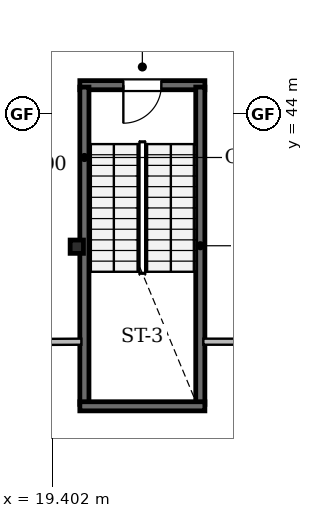
"""IFC4 building model, lengths in metres.
Left out: names, types, materials, properties, quantities, classifications, styles, units other than length and angle.
Written with IfcOpenShell. Run it as: python <this file> out.ifc"""

import sys

from ifc_helpers import new_model, si_unit, direction, frame, frame_2d, origin, origin_2d, place, context, subcontext, project, spatial, rectangle, i_section, extrude, element, fill, save


model = new_model("IFC4")
c1 = context("Model", 3, precision=1e-05, world=origin(), true_north=direction((0.0, 1.0)))
c2 = subcontext(c1, "Body", "Model", "MODEL_VIEW")
j1 = project(units=[si_unit("LENGTHUNIT", "METRE"), si_unit("PLANEANGLEUNIT", "RADIAN")], contexts=[c1])
p1 = place(None, origin())
s1 = spatial("IfcSite", under=j1, at=p1, CompositionType="ELEMENT")
p2 = place(p1, origin())
s2 = spatial("IfcBuilding", under=s1, at=p2, CompositionType="ELEMENT")
p3 = place(p2, frame((0.0, 0.0, 4.8)))
s3 = spatial("IfcBuildingStorey", under=s2, at=p3, CompositionType="ELEMENT", Elevation=4.8)
p4 = place(p3, frame((20.05, 40.5, 0.0), z_axis=(0.0, 0.0, 1.0), x_axis=(1.0, 0.0, 0.0)))
e1 = element("IfcColumn", 1, at=p4, inside=s3, PredefinedType="PILASTER", context=c2, shape_type="SweptSolid", body=[
    extrude(i_section(OverallWidth=0.35, OverallDepth=0.35, WebThickness=0.012, FlangeThickness=0.019, FilletRadius=0.02, at=origin_2d()), origin(), (0.0, 0.0, 1.0), 4.8),
])
p5 = place(p3, frame((20.13, 44.75, 0.0), z_axis=(0.0, 0.0, 1.0), x_axis=(1.0, 0.0, 0.0)))
e2 = element("IfcWall", 2, at=p5, inside=s3, PredefinedType="SHEAR", context=c2, shape_type="SweptSolid", body=[
    extrude(rectangle(XDim=3.29, YDim=0.24, at=frame_2d((1.645, 0.0))), origin(), (0.0, 0.0, 1.0), 4.5),
])
p6 = place(p5, frame((1.145, 0.0, 0.0)))
e3 = element("IfcOpeningElement", 3, at=p6, cuts=e2, PredefinedType="OPENING", context=c2, shape_type="SweptSolid", body=[
    extrude(rectangle(XDim=1.0, YDim=2.15, at=frame_2d((0.5, 1.075))), frame((0.0, 0.13, 0.0), z_axis=(0.0, -1.0, 0.0), x_axis=(1.0, 0.0, 0.0)), (0.0, 0.0, 1.0), 0.26),
])
for number, where, z_axis, x_axis in (
    (4, (20.25, 36.35, 0.0), (0.0, 0.0, 1.0), (0.0, 1.0, 0.0)),
    (5, (23.3, 36.35, 0.0), (0.0, 0.0, 1.0), (0.0, 1.0, 0.0)),
):
    element("IfcWall", number, at=place(p3, frame(where, z_axis=z_axis, x_axis=x_axis)), inside=s3, PredefinedType="SHEAR", context=c2, shape_type="SweptSolid", body=[
        extrude(rectangle(XDim=8.35, YDim=0.24, at=frame_2d((4.175, 0.0))), origin(), (0.0, 0.0, 1.0), 4.5),
    ])
p7 = place(p3, frame((20.13, 36.3, 0.0), z_axis=(0.0, 0.0, 1.0), x_axis=(1.0, 0.0, 0.0)))
e6 = element("IfcWall", 6, at=p7, inside=s3, PredefinedType="SHEAR", context=c2, shape_type="SweptSolid", body=[
    extrude(rectangle(XDim=3.29, YDim=0.24, at=frame_2d((1.645, 0.0))), origin(), (0.0, 0.0, 1.0), 4.5),
])
p8 = place(p3, frame((33.32, 38.0, 0.0), z_axis=(0.0, 0.0, 1.0), x_axis=(-1.0, 0.0, 0.0)))
e7 = element("IfcWall", 7, at=p8, inside=s3, PredefinedType="SOLIDWALL", context=c2, shape_type="SweptSolid", body=[
    extrude(rectangle(XDim=9.94, YDim=0.16, at=frame_2d((4.97, 0.0))), origin(), (0.0, 0.0, 1.0), 4.0),
])
p9 = place(p3, frame((20.17, 38.0, 0.0), z_axis=(0.0, 0.0, 1.0), x_axis=(-0.999985738217, -0.005340726818, 0.0)))
e8 = element("IfcWall", 8, at=p9, inside=s3, PredefinedType="SOLIDWALL", context=c2, shape_type="SweptSolid", body=[
    extrude(rectangle(XDim=6.537, YDim=0.16, at=frame_2d((3.269, 0.0))), origin(), (0.0, 0.0, 1.0), 4.5),
])
p10 = place(p6, frame((1.0, 0.0, 0.0), z_axis=(0.0, 0.0, 1.0), x_axis=(-1.0, 0.0, 0.0)))
e9 = element("IfcDoor", 9, at=p10, inside=s3, OperationType="SINGLE_SWING_LEFT", PredefinedType="DOOR", context=c2, shape_type="SweptSolid", body=[
    extrude(rectangle(XDim=1.0, YDim=2.15, at=frame_2d((0.5, 1.075))), frame((0.0, 0.025, 0.0), z_axis=(0.0, -1.0, 0.0), x_axis=(1.0, 0.0, 0.0)), (0.0, 0.0, 1.0), 0.05),
])
fill(e3, e9)
save(model, sys.argv[1])
